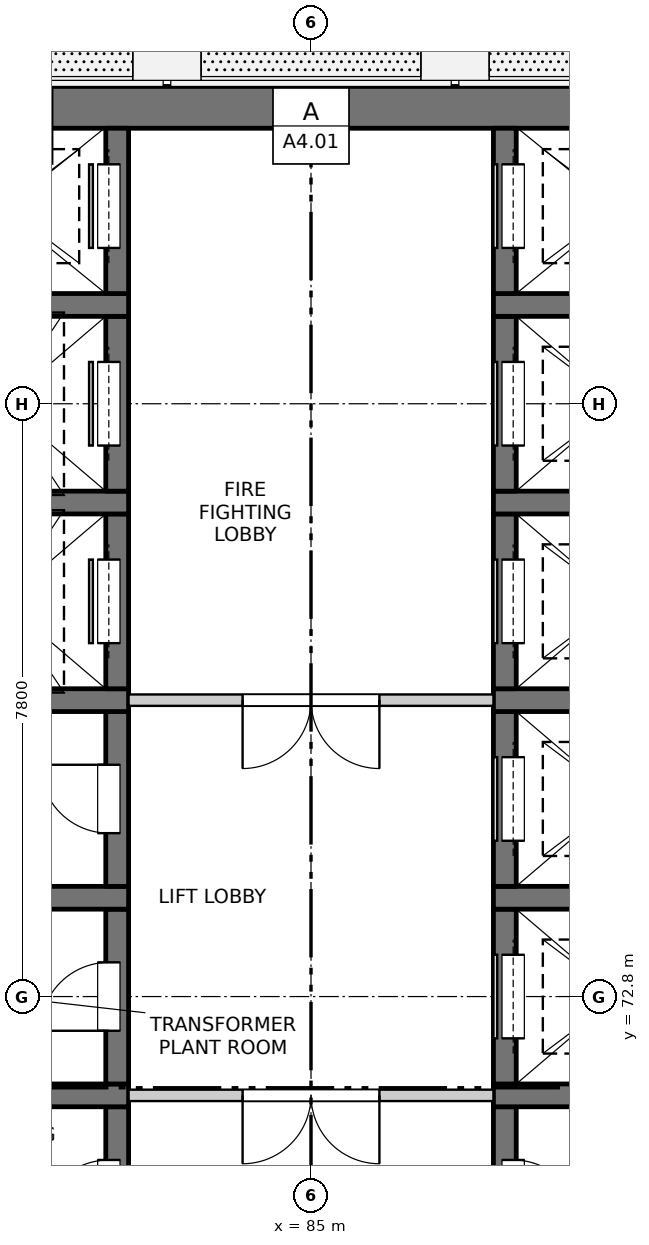
"""IFC4 building model, lengths in metres.
Left out: names, types, materials, properties, quantities, classifications, styles, units other than length and angle.
Written with IfcOpenShell. Run it as: python <this file> out.ifc"""

import sys

from ifc_helpers import new_model, si_unit, direction, frame, frame_2d, origin, place, context, subcontext, project, spatial, rectangle, extrude, element, fill, save


model = new_model("IFC4")
c1 = context("Model", 3, precision=1e-05, world=origin(), true_north=direction((0.0, 1.0)))
c2 = subcontext(c1, "Body", "Model", "MODEL_VIEW")
j1 = project(units=[si_unit("LENGTHUNIT", "METRE"), si_unit("PLANEANGLEUNIT", "RADIAN")], contexts=[c1])
p1 = place(None, origin())
s1 = spatial("IfcSite", under=j1, at=p1, CompositionType="ELEMENT")
p2 = place(p1, origin())
s2 = spatial("IfcBuilding", under=s1, at=p2, CompositionType="ELEMENT")
p3 = place(p2, frame((0.0, 0.0, 144.1)))
s3 = spatial("IfcBuildingStorey", under=s2, at=p3, CompositionType="ELEMENT", Elevation=144.1)
p4 = place(p3, frame((75.525, 84.5, -0.3), z_axis=(0.0, 0.0, 1.0), x_axis=(1.0, 0.0, 0.0)))
e1 = element("IfcWall", 1, at=p4, inside=s3, PredefinedType="SOLIDWALL", context=c2, shape_type="SweptSolid", body=[
    extrude(rectangle(XDim=18.95, YDim=0.55, at=frame_2d((9.475, 0.0))), origin(), (0.0, 0.0, 1.0), 4.5),
])
p5 = place(p3, frame((82.45, 69.05, -0.3), z_axis=(0.0, 0.0, 1.0), x_axis=(0.0, 1.0, 0.0)))
e2 = element("IfcWall", 2, at=p5, inside=s3, PredefinedType="SOLIDWALL", context=c2, shape_type="SweptSolid", body=[
    extrude(rectangle(XDim=2.3, YDim=0.3, at=frame_2d((1.15, 0.0))), origin(), (0.0, 0.0, 1.0), 4.5),
])
p6 = place(p5, frame((0.7, 0.0, 0.3)))
e3 = element("IfcOpeningElement", 3, at=p6, cuts=e2, PredefinedType="OPENING", context=c2, shape_type="SweptSolid", body=[
    extrude(rectangle(XDim=0.9, YDim=2.1, at=frame_2d((0.45, 1.05))), frame((0.0, 0.16, 0.0), z_axis=(0.0, -1.0, 0.0), x_axis=(1.0, 0.0, 0.0)), (0.0, 0.0, 1.0), 0.32),
])
p7 = place(p3, frame((79.6, 71.5, -0.3), z_axis=(0.0, 0.0, 1.0), x_axis=(1.0, 0.0, 0.0)))
e4 = element("IfcWall", 4, at=p7, inside=s3, PredefinedType="SOLIDWALL", context=c2, shape_type="SweptSolid", body=[
    extrude(rectangle(XDim=3.0, YDim=0.3, at=frame_2d((1.5, 0.0))), origin(), (0.0, 0.0, 1.0), 4.5),
])
p8 = place(p3, frame((82.45, 71.65, -0.3), z_axis=(0.0, 0.0, 1.0), x_axis=(0.0, 1.0, 0.0)))
e5 = element("IfcWall", 5, at=p8, inside=s3, PredefinedType="SOLIDWALL", context=c2, shape_type="SweptSolid", body=[
    extrude(rectangle(XDim=2.3, YDim=0.3, at=frame_2d((1.15, 0.0))), origin(), (0.0, 0.0, 1.0), 4.5),
])
p9 = place(p8, frame((0.7, 0.0, 0.3)))
e6 = element("IfcOpeningElement", 6, at=p9, cuts=e5, PredefinedType="OPENING", context=c2, shape_type="SweptSolid", body=[
    extrude(rectangle(XDim=0.9, YDim=2.1, at=frame_2d((0.45, 1.05))), frame((0.0, 0.16, 0.0), z_axis=(0.0, -1.0, 0.0), x_axis=(1.0, 0.0, 0.0)), (0.0, 0.0, 1.0), 0.32),
])
p10 = place(p3, frame((79.6, 74.1, -0.3), z_axis=(0.0, 0.0, 1.0), x_axis=(1.0, 0.0, 0.0)))
e7 = element("IfcWall", 7, at=p10, inside=s3, PredefinedType="SOLIDWALL", context=c2, shape_type="SweptSolid", body=[
    extrude(rectangle(XDim=3.0, YDim=0.3, at=frame_2d((1.5, 0.0))), origin(), (0.0, 0.0, 1.0), 4.5),
])
p11 = place(p3, frame((82.45, 74.25, -0.3), z_axis=(0.0, 0.0, 1.0), x_axis=(0.0, 1.0, 0.0)))
e8 = element("IfcWall", 8, at=p11, inside=s3, PredefinedType="SOLIDWALL", context=c2, shape_type="SweptSolid", body=[
    extrude(rectangle(XDim=2.3, YDim=0.3, at=frame_2d((1.15, 0.0))), origin(), (0.0, 0.0, 1.0), 4.5),
])
p12 = place(p11, frame((0.7, 0.0, 0.3)))
e9 = element("IfcOpeningElement", 9, at=p12, cuts=e8, PredefinedType="OPENING", context=c2, shape_type="SweptSolid", body=[
    extrude(rectangle(XDim=0.9, YDim=2.1, at=frame_2d((0.45, 1.05))), frame((0.0, 0.16, 0.0), z_axis=(0.0, -1.0, 0.0), x_axis=(1.0, 0.0, 0.0)), (0.0, 0.0, 1.0), 0.32),
])
p13 = place(p3, frame((79.6, 76.7, -0.3), z_axis=(0.0, 0.0, 1.0), x_axis=(1.0, 0.0, 0.0)))
e10 = element("IfcWall", 10, at=p13, inside=s3, PredefinedType="SOLIDWALL", context=c2, shape_type="SweptSolid", body=[
    extrude(rectangle(XDim=3.0, YDim=0.3, at=frame_2d((1.5, 0.0))), origin(), (0.0, 0.0, 1.0), 4.5),
])
p14 = place(p3, frame((82.45, 76.85, -0.3), z_axis=(0.0, 0.0, 1.0), x_axis=(0.0, 1.0, 0.0)))
e11 = element("IfcWall", 11, at=p14, inside=s3, PredefinedType="SOLIDWALL", context=c2, shape_type="SweptSolid", body=[
    extrude(rectangle(XDim=2.3, YDim=0.3, at=frame_2d((1.15, 0.0))), origin(), (0.0, 0.0, 1.0), 4.5),
])
p15 = place(p14, frame((0.6, 0.0, 0.3)))
e12 = element("IfcOpeningElement", 12, at=p15, cuts=e11, PredefinedType="OPENING", context=c2, shape_type="SweptSolid", body=[
    extrude(rectangle(XDim=1.1, YDim=2.1, at=frame_2d((0.55, 1.05))), frame((0.0, 0.16, 0.0), z_axis=(0.0, -1.0, 0.0), x_axis=(1.0, 0.0, 0.0)), (0.0, 0.0, 1.0), 0.32),
])
p16 = place(p3, frame((79.6, 79.3, -0.3), z_axis=(0.0, 0.0, 1.0), x_axis=(1.0, 0.0, 0.0)))
e13 = element("IfcWall", 13, at=p16, inside=s3, PredefinedType="SOLIDWALL", context=c2, shape_type="SweptSolid", body=[
    extrude(rectangle(XDim=3.0, YDim=0.3, at=frame_2d((1.5, 0.0))), origin(), (0.0, 0.0, 1.0), 4.5),
])
p17 = place(p3, frame((82.45, 79.45, -0.3), z_axis=(0.0, 0.0, 1.0), x_axis=(0.0, 1.0, 0.0)))
e14 = element("IfcWall", 14, at=p17, inside=s3, PredefinedType="SOLIDWALL", context=c2, shape_type="SweptSolid", body=[
    extrude(rectangle(XDim=2.3, YDim=0.3, at=frame_2d((1.15, 0.0))), origin(), (0.0, 0.0, 1.0), 4.5),
])
p18 = place(p17, frame((0.6, 0.0, 0.3)))
e15 = element("IfcOpeningElement", 15, at=p18, cuts=e14, PredefinedType="OPENING", context=c2, shape_type="SweptSolid", body=[
    extrude(rectangle(XDim=1.1, YDim=2.1, at=frame_2d((0.55, 1.05))), frame((0.0, 0.16, 0.0), z_axis=(0.0, -1.0, 0.0), x_axis=(1.0, 0.0, 0.0)), (0.0, 0.0, 1.0), 0.32),
])
p19 = place(p3, frame((79.6, 81.9, -0.3), z_axis=(0.0, 0.0, 1.0), x_axis=(1.0, 0.0, 0.0)))
e16 = element("IfcWall", 16, at=p19, inside=s3, PredefinedType="SOLIDWALL", context=c2, shape_type="SweptSolid", body=[
    extrude(rectangle(XDim=3.0, YDim=0.3, at=frame_2d((1.5, 0.0))), origin(), (0.0, 0.0, 1.0), 4.5),
])
p20 = place(p3, frame((82.45, 82.05, -0.3), z_axis=(0.0, 0.0, 1.0), x_axis=(0.0, 1.0, 0.0)))
e17 = element("IfcWall", 17, at=p20, inside=s3, PredefinedType="SOLIDWALL", context=c2, shape_type="SweptSolid", body=[
    extrude(rectangle(XDim=2.175, YDim=0.3, at=frame_2d((1.087, 0.0))), origin(), (0.0, 0.0, 1.0), 4.5),
])
p21 = place(p20, frame((0.6, 0.0, 0.3)))
e18 = element("IfcOpeningElement", 18, at=p21, cuts=e17, PredefinedType="OPENING", context=c2, shape_type="SweptSolid", body=[
    extrude(rectangle(XDim=1.1, YDim=2.1, at=frame_2d((0.55, 1.05))), frame((0.0, 0.16, 0.0), z_axis=(0.0, -1.0, 0.0), x_axis=(1.0, 0.0, 0.0)), (0.0, 0.0, 1.0), 0.32),
])
p22 = place(p3, frame((87.55, 69.05, -0.3), z_axis=(0.0, 0.0, 1.0), x_axis=(0.0, 1.0, 0.0)))
e19 = element("IfcWall", 19, at=p22, inside=s3, PredefinedType="SOLIDWALL", context=c2, shape_type="SweptSolid", body=[
    extrude(rectangle(XDim=2.3, YDim=0.3, at=frame_2d((1.15, 0.0))), origin(), (0.0, 0.0, 1.0), 4.5),
])
p23 = place(p22, frame((0.7, 0.0, 0.3)))
e20 = element("IfcOpeningElement", 20, at=p23, cuts=e19, PredefinedType="OPENING", context=c2, shape_type="SweptSolid", body=[
    extrude(rectangle(XDim=0.9, YDim=2.1, at=frame_2d((0.45, 1.05))), frame((0.0, 0.16, 0.0), z_axis=(0.0, -1.0, 0.0), x_axis=(1.0, 0.0, 0.0)), (0.0, 0.0, 1.0), 0.32),
])
p24 = place(p3, frame((87.4, 71.5, -0.3), z_axis=(0.0, 0.0, 1.0), x_axis=(1.0, 0.0, 0.0)))
e21 = element("IfcWall", 21, at=p24, inside=s3, PredefinedType="SOLIDWALL", context=c2, shape_type="SweptSolid", body=[
    extrude(rectangle(XDim=3.0, YDim=0.3, at=frame_2d((1.5, 0.0))), origin(), (0.0, 0.0, 1.0), 4.5),
])
p25 = place(p3, frame((87.55, 71.65, -0.3), z_axis=(0.0, 0.0, 1.0), x_axis=(0.0, 1.0, 0.0)))
e22 = element("IfcWall", 22, at=p25, inside=s3, PredefinedType="SOLIDWALL", context=c2, shape_type="SweptSolid", body=[
    extrude(rectangle(XDim=2.3, YDim=0.3, at=frame_2d((1.15, 0.0))), origin(), (0.0, 0.0, 1.0), 4.5),
])
p26 = place(p25, frame((0.6, 0.0, 0.3)))
e23 = element("IfcOpeningElement", 23, at=p26, cuts=e22, PredefinedType="OPENING", context=c2, shape_type="SweptSolid", body=[
    extrude(rectangle(XDim=1.1, YDim=2.1, at=frame_2d((0.55, 1.05))), frame((0.0, 0.16, 0.0), z_axis=(0.0, -1.0, 0.0), x_axis=(1.0, 0.0, 0.0)), (0.0, 0.0, 1.0), 0.32),
])
p27 = place(p3, frame((87.4, 74.1, -0.3), z_axis=(0.0, 0.0, 1.0), x_axis=(1.0, 0.0, 0.0)))
e24 = element("IfcWall", 24, at=p27, inside=s3, PredefinedType="SOLIDWALL", context=c2, shape_type="SweptSolid", body=[
    extrude(rectangle(XDim=3.0, YDim=0.3, at=frame_2d((1.5, 0.0))), origin(), (0.0, 0.0, 1.0), 4.5),
])
p28 = place(p3, frame((87.55, 74.25, -0.3), z_axis=(0.0, 0.0, 1.0), x_axis=(0.0, 1.0, 0.0)))
e25 = element("IfcWall", 25, at=p28, inside=s3, PredefinedType="SOLIDWALL", context=c2, shape_type="SweptSolid", body=[
    extrude(rectangle(XDim=2.3, YDim=0.3, at=frame_2d((1.15, 0.0))), origin(), (0.0, 0.0, 1.0), 4.5),
])
p29 = place(p28, frame((0.6, 0.0, 0.3)))
e26 = element("IfcOpeningElement", 26, at=p29, cuts=e25, PredefinedType="OPENING", context=c2, shape_type="SweptSolid", body=[
    extrude(rectangle(XDim=1.1, YDim=2.1, at=frame_2d((0.55, 1.05))), frame((0.0, 0.16, 0.0), z_axis=(0.0, -1.0, 0.0), x_axis=(1.0, 0.0, 0.0)), (0.0, 0.0, 1.0), 0.32),
])
p30 = place(p3, frame((87.4, 76.7, -0.3), z_axis=(0.0, 0.0, 1.0), x_axis=(1.0, 0.0, 0.0)))
e27 = element("IfcWall", 27, at=p30, inside=s3, PredefinedType="SOLIDWALL", context=c2, shape_type="SweptSolid", body=[
    extrude(rectangle(XDim=3.0, YDim=0.3, at=frame_2d((1.5, 0.0))), origin(), (0.0, 0.0, 1.0), 4.5),
])
p31 = place(p3, frame((87.55, 76.85, -0.3), z_axis=(0.0, 0.0, 1.0), x_axis=(0.0, 1.0, 0.0)))
e28 = element("IfcWall", 28, at=p31, inside=s3, PredefinedType="SOLIDWALL", context=c2, shape_type="SweptSolid", body=[
    extrude(rectangle(XDim=2.3, YDim=0.3, at=frame_2d((1.15, 0.0))), origin(), (0.0, 0.0, 1.0), 4.5),
])
p32 = place(p31, frame((0.6, 0.0, 0.3)))
e29 = element("IfcOpeningElement", 29, at=p32, cuts=e28, PredefinedType="OPENING", context=c2, shape_type="SweptSolid", body=[
    extrude(rectangle(XDim=1.1, YDim=2.1, at=frame_2d((0.55, 1.05))), frame((0.0, 0.16, 0.0), z_axis=(0.0, -1.0, 0.0), x_axis=(1.0, 0.0, 0.0)), (0.0, 0.0, 1.0), 0.32),
])
p33 = place(p3, frame((87.4, 79.3, -0.3), z_axis=(0.0, 0.0, 1.0), x_axis=(1.0, 0.0, 0.0)))
e30 = element("IfcWall", 30, at=p33, inside=s3, PredefinedType="SOLIDWALL", context=c2, shape_type="SweptSolid", body=[
    extrude(rectangle(XDim=3.0, YDim=0.3, at=frame_2d((1.5, 0.0))), origin(), (0.0, 0.0, 1.0), 4.5),
])
p34 = place(p3, frame((87.55, 79.45, -0.3), z_axis=(0.0, 0.0, 1.0), x_axis=(0.0, 1.0, 0.0)))
e31 = element("IfcWall", 31, at=p34, inside=s3, PredefinedType="SOLIDWALL", context=c2, shape_type="SweptSolid", body=[
    extrude(rectangle(XDim=2.3, YDim=0.3, at=frame_2d((1.15, 0.0))), origin(), (0.0, 0.0, 1.0), 4.5),
])
p35 = place(p34, frame((0.6, 0.0, 0.3)))
e32 = element("IfcOpeningElement", 32, at=p35, cuts=e31, PredefinedType="OPENING", context=c2, shape_type="SweptSolid", body=[
    extrude(rectangle(XDim=1.1, YDim=2.1, at=frame_2d((0.55, 1.05))), frame((0.0, 0.16, 0.0), z_axis=(0.0, -1.0, 0.0), x_axis=(1.0, 0.0, 0.0)), (0.0, 0.0, 1.0), 0.32),
])
p36 = place(p3, frame((87.4, 81.9, -0.3), z_axis=(0.0, 0.0, 1.0), x_axis=(1.0, 0.0, 0.0)))
e33 = element("IfcWall", 33, at=p36, inside=s3, PredefinedType="SOLIDWALL", context=c2, shape_type="SweptSolid", body=[
    extrude(rectangle(XDim=3.0, YDim=0.3, at=frame_2d((1.5, 0.0))), origin(), (0.0, 0.0, 1.0), 4.5),
])
p37 = place(p3, frame((87.55, 82.05, -0.3), z_axis=(0.0, 0.0, 1.0), x_axis=(0.0, 1.0, 0.0)))
e34 = element("IfcWall", 34, at=p37, inside=s3, PredefinedType="SOLIDWALL", context=c2, shape_type="SweptSolid", body=[
    extrude(rectangle(XDim=2.175, YDim=0.3, at=frame_2d((1.087, 0.0))), origin(), (0.0, 0.0, 1.0), 4.5),
])
p38 = place(p37, frame((0.6, 0.0, 0.3)))
e35 = element("IfcOpeningElement", 35, at=p38, cuts=e34, PredefinedType="OPENING", context=c2, shape_type="SweptSolid", body=[
    extrude(rectangle(XDim=1.1, YDim=2.1, at=frame_2d((0.55, 1.05))), frame((0.0, 0.16, 0.0), z_axis=(0.0, -1.0, 0.0), x_axis=(1.0, 0.0, 0.0)), (0.0, 0.0, 1.0), 0.32),
])
p39 = place(p3, frame((82.6, 71.5, 0.0), z_axis=(0.0, 0.0, 1.0), x_axis=(1.0, 0.0, 0.0)))
e36 = element("IfcWall", 36, at=p39, inside=s3, PredefinedType="PARTITIONING", context=c2, shape_type="SweptSolid", body=[
    extrude(rectangle(XDim=4.8, YDim=0.15, at=frame_2d((2.4, 0.0))), origin(), (0.0, 0.0, 1.0), 4.2),
])
p40 = place(p39, frame((1.5, 0.0, 0.0)))
e37 = element("IfcOpeningElement", 37, at=p40, cuts=e36, PredefinedType="OPENING", context=c2, shape_type="SweptSolid", body=[
    extrude(rectangle(XDim=1.8, YDim=2.1, at=frame_2d((0.9, 1.05))), frame((0.0, 0.085, 0.0), z_axis=(0.0, -1.0, 0.0), x_axis=(1.0, 0.0, 0.0)), (0.0, 0.0, 1.0), 0.17),
])
p41 = place(p3, frame((82.6, 76.7, 0.0), z_axis=(0.0, 0.0, 1.0), x_axis=(1.0, 0.0, 0.0)))
e38 = element("IfcWall", 38, at=p41, inside=s3, PredefinedType="PARTITIONING", context=c2, shape_type="SweptSolid", body=[
    extrude(rectangle(XDim=4.8, YDim=0.15, at=frame_2d((2.4, 0.0))), origin(), (0.0, 0.0, 1.0), 4.2),
])
p42 = place(p41, frame((1.5, 0.0, 0.0)))
e39 = element("IfcOpeningElement", 39, at=p42, cuts=e38, PredefinedType="OPENING", context=c2, shape_type="SweptSolid", body=[
    extrude(rectangle(XDim=1.8, YDim=2.1, at=frame_2d((0.9, 1.05))), frame((0.0, 0.085, 0.0), z_axis=(0.0, -1.0, 0.0), x_axis=(1.0, 0.0, 0.0)), (0.0, 0.0, 1.0), 0.17),
])
p43 = place(p6, origin())
e40 = element("IfcDoor", 40, at=p43, inside=s3, OperationType="SINGLE_SWING_LEFT", PredefinedType="DOOR", context=c2, shape_type="SweptSolid", body=[
    extrude(rectangle(XDim=0.9, YDim=2.1, at=frame_2d((0.45, 1.05))), frame((0.0, 0.135, 0.0), z_axis=(0.0, -1.0, 0.0), x_axis=(1.0, 0.0, 0.0)), (0.0, 0.0, 1.0), 0.05),
])
fill(e3, e40)
p44 = place(p23, origin())
e41 = element("IfcDoor", 41, at=p44, inside=s3, OperationType="SINGLE_SWING_RIGHT", PredefinedType="DOOR", context=c2, shape_type="SweptSolid", body=[
    extrude(rectangle(XDim=0.9, YDim=2.1, at=frame_2d((0.45, 1.05))), frame((0.0, -0.085, 0.0), z_axis=(0.0, -1.0, 0.0), x_axis=(1.0, 0.0, 0.0)), (0.0, 0.0, 1.0), 0.05),
])
fill(e20, e41)
p45 = place(p40, origin())
e42 = element("IfcDoor", 42, at=p45, inside=s3, OperationType="DOUBLE_DOOR_SINGLE_SWING", PredefinedType="DOOR", context=c2, shape_type="SweptSolid", body=[
    extrude(rectangle(XDim=1.8, YDim=2.1, at=frame_2d((0.9, 1.05))), frame((0.0, 0.025, 0.0), z_axis=(0.0, -1.0, 0.0), x_axis=(1.0, 0.0, 0.0)), (0.0, 0.0, 1.0), 0.05),
])
fill(e37, e42)
p46 = place(p9, origin())
e43 = element("IfcDoor", 43, at=p46, inside=s3, OperationType="SINGLE_SWING_LEFT", PredefinedType="DOOR", context=c2, shape_type="SweptSolid", body=[
    extrude(rectangle(XDim=0.9, YDim=2.1, at=frame_2d((0.45, 1.05))), frame((0.0, 0.135, 0.0), z_axis=(0.0, -1.0, 0.0), x_axis=(1.0, 0.0, 0.0)), (0.0, 0.0, 1.0), 0.05),
])
fill(e6, e43)
p47 = place(p26, origin())
e44 = element("IfcDoor", 44, at=p47, inside=s3, OperationType="SLIDING_TO_LEFT", PredefinedType="DOOR", context=c2, shape_type="SweptSolid", body=[
    extrude(rectangle(XDim=1.1, YDim=2.1, at=frame_2d((0.55, 1.05))), frame((0.0, -0.085, 0.0), z_axis=(0.0, -1.0, 0.0), x_axis=(1.0, 0.0, 0.0)), (0.0, 0.0, 1.0), 0.05),
])
fill(e23, e44)
p48 = place(p12, origin())
e45 = element("IfcDoor", 45, at=p48, inside=s3, OperationType="SINGLE_SWING_RIGHT", PredefinedType="DOOR", context=c2, shape_type="SweptSolid", body=[
    extrude(rectangle(XDim=0.9, YDim=2.1, at=frame_2d((0.45, 1.05))), frame((0.0, 0.135, 0.0), z_axis=(0.0, -1.0, 0.0), x_axis=(1.0, 0.0, 0.0)), (0.0, 0.0, 1.0), 0.05),
])
fill(e9, e45)
p49 = place(p29, origin())
e46 = element("IfcDoor", 46, at=p49, inside=s3, OperationType="SLIDING_TO_LEFT", PredefinedType="DOOR", context=c2, shape_type="SweptSolid", body=[
    extrude(rectangle(XDim=1.1, YDim=2.1, at=frame_2d((0.55, 1.05))), frame((0.0, -0.085, 0.0), z_axis=(0.0, -1.0, 0.0), x_axis=(1.0, 0.0, 0.0)), (0.0, 0.0, 1.0), 0.05),
])
fill(e26, e46)
p50 = place(p42, origin())
e47 = element("IfcDoor", 47, at=p50, inside=s3, OperationType="DOUBLE_DOOR_SINGLE_SWING", PredefinedType="DOOR", context=c2, shape_type="SweptSolid", body=[
    extrude(rectangle(XDim=1.8, YDim=2.1, at=frame_2d((0.9, 1.05))), frame((0.0, 0.025, 0.0), z_axis=(0.0, -1.0, 0.0), x_axis=(1.0, 0.0, 0.0)), (0.0, 0.0, 1.0), 0.05),
])
fill(e39, e47)
p51 = place(p15, origin())
e48 = element("IfcDoor", 48, at=p51, inside=s3, OperationType="SLIDING_TO_LEFT", PredefinedType="DOOR", context=c2, shape_type="SweptSolid", body=[
    extrude(rectangle(XDim=1.1, YDim=2.1, at=frame_2d((0.55, 1.05))), frame((0.0, 0.135, 0.0), z_axis=(0.0, -1.0, 0.0), x_axis=(1.0, 0.0, 0.0)), (0.0, 0.0, 1.0), 0.05),
])
fill(e12, e48)
p52 = place(p32, origin())
e49 = element("IfcDoor", 49, at=p52, inside=s3, OperationType="SLIDING_TO_LEFT", PredefinedType="DOOR", context=c2, shape_type="SweptSolid", body=[
    extrude(rectangle(XDim=1.1, YDim=2.1, at=frame_2d((0.55, 1.05))), frame((0.0, -0.085, 0.0), z_axis=(0.0, -1.0, 0.0), x_axis=(1.0, 0.0, 0.0)), (0.0, 0.0, 1.0), 0.05),
])
fill(e29, e49)
p53 = place(p18, origin())
e50 = element("IfcDoor", 50, at=p53, inside=s3, OperationType="SLIDING_TO_LEFT", PredefinedType="DOOR", context=c2, shape_type="SweptSolid", body=[
    extrude(rectangle(XDim=1.1, YDim=2.1, at=frame_2d((0.55, 1.05))), frame((0.0, 0.135, 0.0), z_axis=(0.0, -1.0, 0.0), x_axis=(1.0, 0.0, 0.0)), (0.0, 0.0, 1.0), 0.05),
])
fill(e15, e50)
p54 = place(p35, origin())
e51 = element("IfcDoor", 51, at=p54, inside=s3, OperationType="SLIDING_TO_RIGHT", PredefinedType="DOOR", context=c2, shape_type="SweptSolid", body=[
    extrude(rectangle(XDim=1.1, YDim=2.1, at=frame_2d((0.55, 1.05))), frame((0.0, -0.085, 0.0), z_axis=(0.0, -1.0, 0.0), x_axis=(1.0, 0.0, 0.0)), (0.0, 0.0, 1.0), 0.05),
])
fill(e32, e51)
p55 = place(p21, origin())
e52 = element("IfcDoor", 52, at=p55, inside=s3, OperationType="SLIDING_TO_RIGHT", PredefinedType="DOOR", context=c2, shape_type="SweptSolid", body=[
    extrude(rectangle(XDim=1.1, YDim=2.1, at=frame_2d((0.55, 1.05))), frame((0.0, 0.135, 0.0), z_axis=(0.0, -1.0, 0.0), x_axis=(1.0, 0.0, 0.0)), (0.0, 0.0, 1.0), 0.05),
])
fill(e18, e52)
p56 = place(p38, origin())
e53 = element("IfcDoor", 53, at=p56, inside=s3, OperationType="SLIDING_TO_RIGHT", PredefinedType="DOOR", context=c2, shape_type="SweptSolid", body=[
    extrude(rectangle(XDim=1.1, YDim=2.1, at=frame_2d((0.55, 1.05))), frame((0.0, -0.085, 0.0), z_axis=(0.0, -1.0, 0.0), x_axis=(1.0, 0.0, 0.0)), (0.0, 0.0, 1.0), 0.05),
])
fill(e35, e53)
save(model, sys.argv[1])
